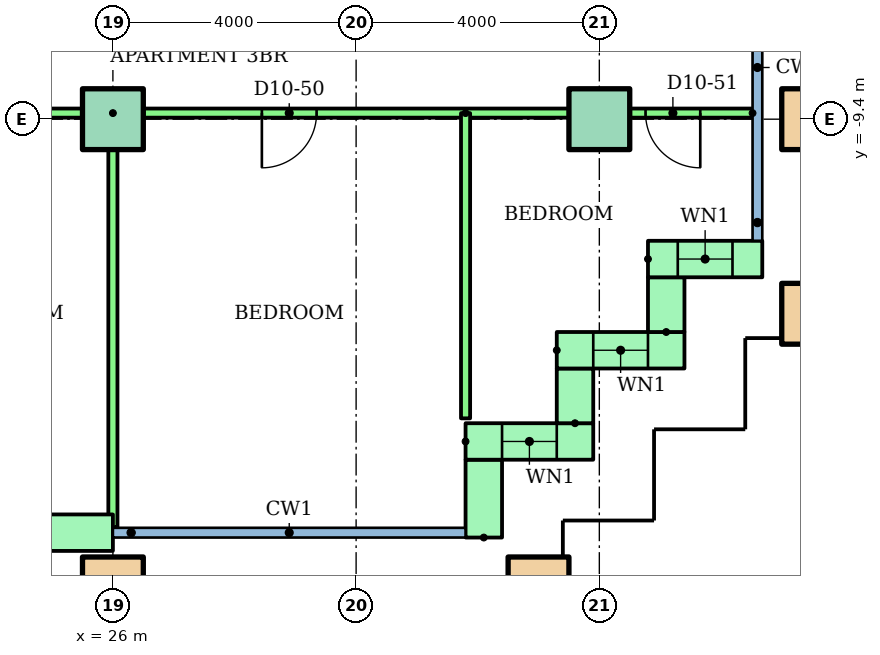
"""IFC4 building model, lengths in metres.
Left out: names, types, materials, properties, quantities, classifications, styles, units other than length and angle.
Written with IfcOpenShell. Run it as: python <this file> out.ifc"""

import sys

from ifc_helpers import new_model, si_unit, direction, frame, frame_2d, origin, origin_2d, place, context, subcontext, project, spatial, rectangle, hollow_rectangle, extrude, element, fill, save


model = new_model("IFC4")
c1 = context("Model", 3, precision=1e-05, world=origin(), true_north=direction((0.0, 1.0)))
c2 = subcontext(c1, "Body", "Model", "MODEL_VIEW")
j1 = project(units=[si_unit("LENGTHUNIT", "METRE"), si_unit("PLANEANGLEUNIT", "RADIAN")], contexts=[c1])
p1 = place(None, origin())
s1 = spatial("IfcSite", under=j1, at=p1, CompositionType="ELEMENT")
p2 = place(p1, origin())
s2 = spatial("IfcBuilding", under=s1, at=p2, CompositionType="ELEMENT")
p3 = place(p2, frame((0.0, 0.0, 41.6)))
s3 = spatial("IfcBuildingStorey", under=s2, at=p3, CompositionType="ELEMENT", Elevation=41.6)
for number, where in (
    (1, (26.0, -17.1, 0.0)),
    (2, (33.0, -17.1, 0.0)),
    (3, (37.5, -12.6, 0.0)),
):
    element("IfcColumn", number, at=place(p3, frame(where)), inside=s3, PredefinedType="COLUMN", context=c2, shape_type="SweptSolid", body=[
        extrude(hollow_rectangle(XDim=1.0, YDim=1.0, WallThickness=0.05, at=origin_2d()), origin(), (0.0, 0.0, 1.0), 3.2),
    ])
for number, where in (
    (4, (26.0, -9.4, 0.0)),
    (5, (34.0, -9.4, 0.0)),
):
    element("IfcColumn", number, at=place(p3, frame(where)), inside=s3, PredefinedType="COLUMN", context=c2, shape_type="SweptSolid", body=[
        extrude(rectangle(XDim=1.0, YDim=1.0, at=origin_2d()), origin(), (0.0, 0.0, 1.0), 3.2),
    ])
p4 = place(p3, frame((37.5, -9.4, 0.0)))
e6 = element("IfcColumn", 6, at=p4, inside=s3, PredefinedType="COLUMN", context=c2, shape_type="SweptSolid", body=[
    extrude(hollow_rectangle(XDim=1.0, YDim=1.0, WallThickness=0.05, at=origin_2d()), origin(), (0.0, 0.0, 1.0), 3.2),
])
p5 = place(p3, frame((22.0, -16.2, 0.0)))
e7 = element("IfcWall", 7, at=p5, inside=s3, PredefinedType="STANDARD", context=c2, shape_type="SweptSolid", body=[
    extrude(rectangle(XDim=4.0, YDim=0.6, at=frame_2d((2.0, 0.0))), origin(), (0.0, 0.0, 1.0), 2.92),
])
p6 = place(p5, frame((1.4, 0.0, 0.0)))
e8 = element("IfcOpeningElement", 8, at=p6, cuts=e7, PredefinedType="OPENING", context=c2, shape_type="SweptSolid", body=[
    extrude(rectangle(XDim=1.2, YDim=2.1, at=frame_2d((0.6, 1.05))), frame((0.0, 0.31, 0.0), z_axis=(0.0, -1.0, 0.0), x_axis=(1.0, 0.0, 0.0)), (0.0, 0.0, 1.0), 0.62),
])
p7 = place(p3, frame((32.1, -16.28, 0.0), z_axis=(0.0, 0.0, 1.0), x_axis=(0.0, 1.0, 0.0)))
e9 = element("IfcWall", 9, at=p7, inside=s3, PredefinedType="STANDARD", context=c2, shape_type="SweptSolid", body=[
    extrude(rectangle(XDim=1.28, YDim=0.6, at=frame_2d((0.64, 0.0))), origin(), (0.0, 0.0, 1.0), 2.92),
])
p8 = place(p3, frame((31.8, -14.7, 0.0)))
e10 = element("IfcWall", 10, at=p8, inside=s3, PredefinedType="STANDARD", context=c2, shape_type="SweptSolid", body=[
    extrude(rectangle(XDim=2.1, YDim=0.6, at=frame_2d((1.05, 0.0))), origin(), (0.0, 0.0, 1.0), 2.92),
])
p9 = place(p8, frame((0.6, 0.0, 0.9)))
e11 = element("IfcOpeningElement", 11, at=p9, cuts=e10, PredefinedType="OPENING", context=c2, shape_type="SweptSolid", body=[
    extrude(rectangle(XDim=0.9, YDim=1.5, at=frame_2d((0.45, 0.75))), frame((0.0, 0.31, 0.0), z_axis=(0.0, -1.0, 0.0), x_axis=(1.0, 0.0, 0.0)), (0.0, 0.0, 1.0), 0.62),
])
p10 = place(p3, frame((33.6, -14.4, 0.0), z_axis=(0.0, 0.0, 1.0), x_axis=(0.0, 1.0, 0.0)))
e12 = element("IfcWall", 12, at=p10, inside=s3, PredefinedType="STANDARD", context=c2, shape_type="SweptSolid", body=[
    extrude(rectangle(XDim=0.9, YDim=0.6, at=frame_2d((0.45, 0.0))), origin(), (0.0, 0.0, 1.0), 2.92),
])
p11 = place(p3, frame((33.3, -13.2, 0.0)))
e13 = element("IfcWall", 13, at=p11, inside=s3, PredefinedType="STANDARD", context=c2, shape_type="SweptSolid", body=[
    extrude(rectangle(XDim=2.1, YDim=0.6, at=frame_2d((1.05, 0.0))), origin(), (0.0, 0.0, 1.0), 2.92),
])
p12 = place(p11, frame((0.6, 0.0, 0.9)))
e14 = element("IfcOpeningElement", 14, at=p12, cuts=e13, PredefinedType="OPENING", context=c2, shape_type="SweptSolid", body=[
    extrude(rectangle(XDim=0.9, YDim=1.5, at=frame_2d((0.45, 0.75))), frame((0.0, 0.31, 0.0), z_axis=(0.0, -1.0, 0.0), x_axis=(1.0, 0.0, 0.0)), (0.0, 0.0, 1.0), 0.62),
])
p13 = place(p3, frame((35.1, -12.9, 0.0), z_axis=(0.0, 0.0, 1.0), x_axis=(0.0, 1.0, 0.0)))
e15 = element("IfcWall", 15, at=p13, inside=s3, PredefinedType="STANDARD", context=c2, shape_type="SweptSolid", body=[
    extrude(rectangle(XDim=0.9, YDim=0.6, at=frame_2d((0.45, 0.0))), origin(), (0.0, 0.0, 1.0), 2.92),
])
p14 = place(p3, frame((34.8, -11.7, 0.0)))
e16 = element("IfcWall", 16, at=p14, inside=s3, PredefinedType="STANDARD", context=c2, shape_type="SweptSolid", body=[
    extrude(rectangle(XDim=1.88, YDim=0.6, at=frame_2d((0.94, 0.0))), origin(), (0.0, 0.0, 1.0), 2.92),
])
p15 = place(p14, frame((0.49, 0.0, 0.9)))
e17 = element("IfcOpeningElement", 17, at=p15, cuts=e16, PredefinedType="OPENING", context=c2, shape_type="SweptSolid", body=[
    extrude(rectangle(XDim=0.9, YDim=1.5, at=frame_2d((0.45, 0.75))), frame((0.0, 0.31, 0.0), z_axis=(0.0, -1.0, 0.0), x_axis=(1.0, 0.0, 0.0)), (0.0, 0.0, 1.0), 0.62),
])
p16 = place(p3, frame((36.52, -9.3, 0.0), z_axis=(0.0, 0.0, 1.0), x_axis=(-1.0, 0.0, 0.0)))
e18 = element("IfcWall", 18, at=p16, inside=s3, PredefinedType="PARTITIONING", context=c2, shape_type="SweptSolid", body=[
    extrude(rectangle(XDim=18.52, YDim=0.15, at=frame_2d((9.26, 0.0))), origin(), (0.0, 0.0, 1.0), 2.4),
])
p17 = place(p16, frame((16.07, 0.0, 0.0)))
e19 = element("IfcOpeningElement", 19, at=p17, cuts=e18, PredefinedType="OPENING", context=c2, shape_type="SweptSolid", body=[
    extrude(rectangle(XDim=0.9, YDim=2.1, at=frame_2d((0.45, 1.05))), frame((0.0, 0.085, 0.0), z_axis=(0.0, -1.0, 0.0), x_axis=(1.0, 0.0, 0.0)), (0.0, 0.0, 1.0), 0.17),
])
p18 = place(p16, frame((12.02, 0.0, 0.0)))
e20 = element("IfcOpeningElement", 20, at=p18, cuts=e18, PredefinedType="OPENING", context=c2, shape_type="SweptSolid", body=[
    extrude(rectangle(XDim=1.0, YDim=2.1, at=frame_2d((0.5, 1.05))), frame((0.0, 0.085, 0.0), z_axis=(0.0, -1.0, 0.0), x_axis=(1.0, 0.0, 0.0)), (0.0, 0.0, 1.0), 0.17),
])
p19 = place(p16, frame((7.17, 0.0, 0.0)))
e21 = element("IfcOpeningElement", 21, at=p19, cuts=e18, PredefinedType="OPENING", context=c2, shape_type="SweptSolid", body=[
    extrude(rectangle(XDim=0.9, YDim=2.1, at=frame_2d((0.45, 1.05))), frame((0.0, 0.085, 0.0), z_axis=(0.0, -1.0, 0.0), x_axis=(1.0, 0.0, 0.0)), (0.0, 0.0, 1.0), 0.17),
])
p20 = place(p16, frame((0.86, 0.0, 0.0)))
e22 = element("IfcOpeningElement", 22, at=p20, cuts=e18, PredefinedType="OPENING", context=c2, shape_type="SweptSolid", body=[
    extrude(rectangle(XDim=0.9, YDim=2.1, at=frame_2d((0.45, 1.05))), frame((0.0, 0.085, 0.0), z_axis=(0.0, -1.0, 0.0), x_axis=(1.0, 0.0, 0.0)), (0.0, 0.0, 1.0), 0.17),
])
p21 = place(p3, frame((26.0, -9.3, 0.0), z_axis=(0.0, 0.0, 1.0), x_axis=(0.0, -1.0, 0.0)))
e23 = element("IfcWall", 23, at=p21, inside=s3, PredefinedType="PARTITIONING", context=c2, shape_type="SweptSolid", body=[
    extrude(rectangle(XDim=6.81, YDim=0.15, at=frame_2d((3.405, 0.0))), origin(), (0.0, 0.0, 1.0), 2.4),
])
p22 = place(p3, frame((31.8, -9.3, 0.0), z_axis=(0.0, 0.0, 1.0), x_axis=(0.0, -1.0, 0.0)))
e24 = element("IfcWall", 24, at=p22, inside=s3, PredefinedType="PARTITIONING", context=c2, shape_type="SweptSolid", body=[
    extrude(rectangle(XDim=5.02, YDim=0.15, at=frame_2d((2.51, 0.0))), origin(), (0.0, 0.0, 1.0), 2.4),
])
p23 = place(p9, origin())
e25 = element("IfcWindow", 25, at=p23, inside=s3, PartitioningType="SINGLE_PANEL", PredefinedType="WINDOW", context=c2, shape_type="SweptSolid", body=[
    extrude(rectangle(XDim=0.9, YDim=1.5, at=frame_2d((0.45, 0.75))), frame((0.0, 0.03, 0.0), z_axis=(0.0, -1.0, 0.0), x_axis=(1.0, 0.0, 0.0)), (0.0, 0.0, 1.0), 0.06),
])
fill(e11, e25)
p24 = place(p12, origin())
e26 = element("IfcWindow", 26, at=p24, inside=s3, PartitioningType="SINGLE_PANEL", PredefinedType="WINDOW", context=c2, shape_type="SweptSolid", body=[
    extrude(rectangle(XDim=0.9, YDim=1.5, at=frame_2d((0.45, 0.75))), frame((0.0, 0.03, 0.0), z_axis=(0.0, -1.0, 0.0), x_axis=(1.0, 0.0, 0.0)), (0.0, 0.0, 1.0), 0.06),
])
fill(e14, e26)
p25 = place(p15, origin())
e27 = element("IfcWindow", 27, at=p25, inside=s3, PartitioningType="SINGLE_PANEL", PredefinedType="WINDOW", context=c2, shape_type="SweptSolid", body=[
    extrude(rectangle(XDim=0.9, YDim=1.5, at=frame_2d((0.45, 0.75))), frame((0.0, 0.03, 0.0), z_axis=(0.0, -1.0, 0.0), x_axis=(1.0, 0.0, 0.0)), (0.0, 0.0, 1.0), 0.06),
])
fill(e17, e27)
p26 = place(p19, origin())
e28 = element("IfcDoor", 28, at=p26, inside=s3, OperationType="SINGLE_SWING_RIGHT", PredefinedType="DOOR", context=c2, shape_type="SweptSolid", body=[
    extrude(rectangle(XDim=0.9, YDim=2.1, at=frame_2d((0.45, 1.05))), frame((0.0, 0.025, 0.0), z_axis=(0.0, -1.0, 0.0), x_axis=(1.0, 0.0, 0.0)), (0.0, 0.0, 1.0), 0.05),
])
fill(e21, e28)
p27 = place(p20, origin())
e29 = element("IfcDoor", 29, at=p27, inside=s3, OperationType="SINGLE_SWING_LEFT", PredefinedType="DOOR", context=c2, shape_type="SweptSolid", body=[
    extrude(rectangle(XDim=0.9, YDim=2.1, at=frame_2d((0.45, 1.05))), frame((0.0, 0.025, 0.0), z_axis=(0.0, -1.0, 0.0), x_axis=(1.0, 0.0, 0.0)), (0.0, 0.0, 1.0), 0.05),
])
fill(e22, e29)
save(model, sys.argv[1])
